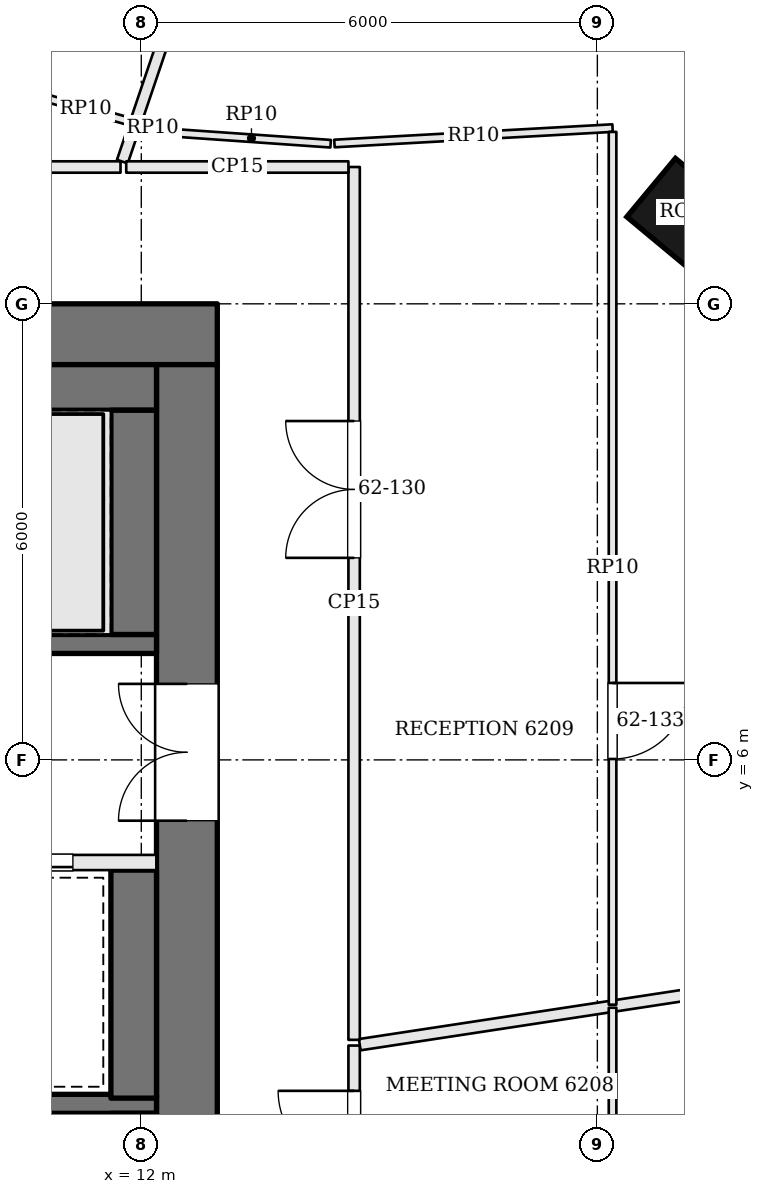
"""IFC4 building model, lengths in metres.
Left out: names, types, materials, properties, quantities, classifications, styles, units other than length and angle.
Written with IfcOpenShell. Run it as: python <this file> out.ifc"""

import sys

from ifc_helpers import new_model, si_unit, direction, frame, frame_2d, origin, origin_2d, place, context, subcontext, project, spatial, rectangle, extrude, element, fill, save


model = new_model("IFC4")
c1 = context("Model", 3, precision=1e-05, world=origin(), true_north=direction((0.0, 1.0)))
c2 = subcontext(c1, "Body", "Model", "MODEL_VIEW")
j1 = project(units=[si_unit("LENGTHUNIT", "METRE"), si_unit("PLANEANGLEUNIT", "RADIAN")], contexts=[c1])
p1 = place(None, origin())
s1 = spatial("IfcSite", under=j1, at=p1, CompositionType="ELEMENT")
p2 = place(p1, origin())
s2 = spatial("IfcBuilding", under=s1, at=p2, CompositionType="ELEMENT")
p3 = place(p2, frame((0.0, 0.0, 252.6)))
s3 = spatial("IfcBuildingStorey", under=s2, at=p3, CompositionType="ELEMENT", Elevation=252.6)
p4 = place(p3, frame((-13.0, 11.6, 0.0), z_axis=(0.0, 0.0, 1.0), x_axis=(1.0, 0.0, 0.0)))
e1 = element("IfcWall", 1, at=p4, inside=s3, PredefinedType="SHEAR", context=c2, shape_type="SweptSolid", body=[
    extrude(rectangle(XDim=26.0, YDim=0.8, at=frame_2d((13.0, 0.0))), origin(), (0.0, 0.0, 1.0), 3.9),
])
p5 = place(p4, frame((9.65, 0.0, 0.0)))
e2 = element("IfcOpeningElement", 2, at=p5, cuts=e1, PredefinedType="OPENING", context=c2, shape_type="SweptSolid", body=[
    extrude(rectangle(XDim=1.0, YDim=2.1, at=frame_2d((0.5, 1.05))), frame((0.0, 0.41, 0.0), z_axis=(0.0, -1.0, 0.0), x_axis=(1.0, 0.0, 0.0)), (0.0, 0.0, 1.0), 0.82),
])
p6 = place(p4, frame((12.675, 0.0, 0.0)))
e3 = element("IfcOpeningElement", 3, at=p6, cuts=e1, PredefinedType="OPENING", context=c2, shape_type="SweptSolid", body=[
    extrude(rectangle(XDim=0.7, YDim=2.1, at=frame_2d((0.35, 1.05))), frame((0.0, 0.41, 0.0), z_axis=(0.0, -1.0, 0.0), x_axis=(1.0, 0.0, 0.0)), (0.0, 0.0, 1.0), 0.82),
])
p7 = place(p4, frame((14.725, 0.0, 0.0)))
e4 = element("IfcOpeningElement", 4, at=p7, cuts=e1, PredefinedType="OPENING", context=c2, shape_type="SweptSolid", body=[
    extrude(rectangle(XDim=0.7, YDim=2.1, at=frame_2d((0.35, 1.05))), frame((0.0, 0.41, 0.0), z_axis=(0.0, -1.0, 0.0), x_axis=(1.0, 0.0, 0.0)), (0.0, 0.0, 1.0), 0.82),
])
p8 = place(p4, frame((16.6, 0.0, 0.0)))
e5 = element("IfcOpeningElement", 5, at=p8, cuts=e1, PredefinedType="OPENING", context=c2, shape_type="SweptSolid", body=[
    extrude(rectangle(XDim=1.0, YDim=2.1, at=frame_2d((0.5, 1.05))), frame((0.0, 0.41, 0.0), z_axis=(0.0, -1.0, 0.0), x_axis=(1.0, 0.0, 0.0)), (0.0, 0.0, 1.0), 0.82),
])
p9 = place(p3, frame((12.6, -2.2, 0.0), z_axis=(0.0, 0.0, 1.0), x_axis=(0.0, 1.0, 0.0)))
e6 = element("IfcWall", 6, at=p9, inside=s3, PredefinedType="SHEAR", context=c2, shape_type="SweptSolid", body=[
    extrude(rectangle(XDim=13.4, YDim=0.8, at=frame_2d((6.7, 0.0))), origin(), (0.0, 0.0, 1.0), 3.9),
])
p10 = place(p9, frame((7.4, 0.0, 0.0)))
e7 = element("IfcOpeningElement", 7, at=p10, cuts=e6, PredefinedType="OPENING", context=c2, shape_type="SweptSolid", body=[
    extrude(rectangle(XDim=1.8, YDim=2.1, at=frame_2d((0.9, 1.05))), frame((0.0, 0.41, 0.0), z_axis=(0.0, -1.0, 0.0), x_axis=(1.0, 0.0, 0.0)), (0.0, 0.0, 1.0), 0.82),
])
p11 = place(p3, frame((19.092, 13.209, 0.0), z_axis=(0.0, 0.0, 1.0), x_axis=(-0.76886986222, 0.63940529789, 0.0)))
e8 = element("IfcColumn", 8, at=p11, inside=s3, PredefinedType="COLUMN", context=c2, shape_type="SweptSolid", body=[
    extrude(rectangle(XDim=1.0, YDim=1.0, at=origin_2d()), origin(), (0.0, 0.0, 1.0), 3.9),
])
p12 = place(p3, frame((12.2, 7.525, 0.0), z_axis=(0.0, 0.0, 1.0), x_axis=(-1.0, 0.0, 0.0)))
e9 = element("IfcWall", 9, at=p12, inside=s3, PredefinedType="SOLIDWALL", context=c2, shape_type="SweptSolid", body=[
    extrude(rectangle(XDim=7.1, YDim=0.25, at=frame_2d((3.55, 0.0))), origin(), (0.0, 0.0, 1.0), 3.7),
])
p13 = place(p12, frame((5.8, 0.0, 0.0)))
e10 = element("IfcOpeningElement", 10, at=p13, cuts=e9, PredefinedType="OPENING", context=c2, shape_type="SweptSolid", body=[
    extrude(rectangle(XDim=1.2, YDim=2.1, at=frame_2d((0.6, 1.05))), frame((0.0, 0.135, 0.0), z_axis=(0.0, -1.0, 0.0), x_axis=(1.0, 0.0, 0.0)), (0.0, 0.0, 1.0), 0.27),
])
p14 = place(p3, frame((12.2, 4.65, 0.0), z_axis=(0.0, 0.0, 1.0), x_axis=(-1.0, 0.0, 0.0)))
e11 = element("IfcWall", 11, at=p14, inside=s3, PredefinedType="SOLIDWALL", context=c2, shape_type="SweptSolid", body=[
    extrude(rectangle(XDim=7.1, YDim=0.2, at=frame_2d((3.55, 0.0))), origin(), (0.0, 0.0, 1.0), 3.7),
])
p15 = place(p14, frame((4.4, 0.0, 0.0)))
e12 = element("IfcOpeningElement", 12, at=p15, cuts=e11, PredefinedType="OPENING", context=c2, shape_type="SweptSolid", body=[
    extrude(rectangle(XDim=1.2, YDim=2.1, at=frame_2d((0.6, 1.05))), frame((0.0, 0.11, 0.0), z_axis=(0.0, -1.0, 0.0), x_axis=(1.0, 0.0, 0.0)), (0.0, 0.0, 1.0), 0.22),
])
p16 = place(p14, frame((1.1, 0.0, 0.0)))
e13 = element("IfcOpeningElement", 13, at=p16, cuts=e11, PredefinedType="OPENING", context=c2, shape_type="SweptSolid", body=[
    extrude(rectangle(XDim=1.2, YDim=2.1, at=frame_2d((0.6, 1.05))), frame((0.0, 0.11, 0.0), z_axis=(0.0, -1.0, 0.0), x_axis=(1.0, 0.0, 0.0)), (0.0, 0.0, 1.0), 0.22),
])
p17 = place(p3, frame((12.2, 1.475, 0.0), z_axis=(0.0, 0.0, 1.0), x_axis=(-1.0, 0.0, 0.0)))
e14 = element("IfcWall", 14, at=p17, inside=s3, PredefinedType="SOLIDWALL", context=c2, shape_type="SweptSolid", body=[
    extrude(rectangle(XDim=7.1, YDim=0.25, at=frame_2d((3.55, 0.0))), origin(), (0.0, 0.0, 1.0), 3.7),
])
p18 = place(p17, frame((5.8, 0.0, 0.0)))
e15 = element("IfcOpeningElement", 15, at=p18, cuts=e14, PredefinedType="OPENING", context=c2, shape_type="SweptSolid", body=[
    extrude(rectangle(XDim=1.2, YDim=2.1, at=frame_2d((0.6, 1.05))), frame((0.0, 0.135, 0.0), z_axis=(0.0, -1.0, 0.0), x_axis=(1.0, 0.0, 0.0)), (0.0, 0.0, 1.0), 0.27),
])
p19 = place(p3, frame((12.2, 10.9, 0.0), z_axis=(0.0, 0.0, 1.0), x_axis=(-1.0, 0.0, 0.0)))
e16 = element("IfcWall", 16, at=p19, inside=s3, PredefinedType="SOLIDWALL", context=c2, shape_type="SweptSolid", body=[
    extrude(rectangle(XDim=7.1, YDim=0.6, at=frame_2d((3.55, 0.0))), origin(), (0.0, 0.0, 1.0), 3.7),
])
p20 = place(p3, frame((11.9, 10.6, 0.0), z_axis=(0.0, 0.0, 1.0), x_axis=(0.0, -1.0, 0.0)))
e17 = element("IfcWall", 17, at=p20, inside=s3, PredefinedType="SOLIDWALL", context=c2, shape_type="SweptSolid", body=[
    extrude(rectangle(XDim=2.95, YDim=0.6, at=frame_2d((1.475, 0.0))), origin(), (0.0, 0.0, 1.0), 3.7),
])
p21 = place(p3, frame((11.9, 4.55, 0.0), z_axis=(0.0, 0.0, 1.0), x_axis=(0.0, -1.0, 0.0)))
e18 = element("IfcWall", 18, at=p21, inside=s3, PredefinedType="SOLIDWALL", context=c2, shape_type="SweptSolid", body=[
    extrude(rectangle(XDim=3.0, YDim=0.6, at=frame_2d((1.5, 0.0))), origin(), (0.0, 0.0, 1.0), 3.7),
])
p22 = place(p3, frame((11.9, 1.35, 0.0), z_axis=(0.0, 0.0, 1.0), x_axis=(0.0, -1.0, 0.0)))
e19 = element("IfcWall", 19, at=p22, inside=s3, PredefinedType="SOLIDWALL", context=c2, shape_type="SweptSolid", body=[
    extrude(rectangle(XDim=2.95, YDim=0.6, at=frame_2d((1.475, 0.0))), origin(), (0.0, 0.0, 1.0), 3.7),
])
p23 = place(p3, frame((11.727, 13.8, 0.0), z_axis=(0.0, 0.0, 1.0), x_axis=(-1.0, 0.0, 0.0)))
e20 = element("IfcWall", 20, at=p23, inside=s3, PredefinedType="PARTITIONING", context=c2, shape_type="SweptSolid", body=[
    extrude(rectangle(XDim=11.554, YDim=0.15, at=frame_2d((5.777, 0.0))), origin(), (0.0, 0.0, 1.0), 3.084),
])
p24 = place(p23, frame((2.04, 0.0, 0.0)))
e21 = element("IfcOpeningElement", 21, at=p24, cuts=e20, PredefinedType="OPENING", context=c2, shape_type="SweptSolid", body=[
    extrude(rectangle(XDim=1.8, YDim=2.1, at=frame_2d((0.9, 1.05))), frame((0.0, 0.085, 0.0), z_axis=(0.0, -1.0, 0.0), x_axis=(1.0, 0.0, 0.0)), (0.0, 0.0, 1.0), 0.17),
])
p25 = place(p23, frame((6.737, 0.0, 0.0)))
e22 = element("IfcOpeningElement", 22, at=p25, cuts=e20, PredefinedType="OPENING", context=c2, shape_type="SweptSolid", body=[
    extrude(rectangle(XDim=1.0, YDim=2.4, at=frame_2d((0.5, 1.2))), frame((0.0, 0.085, 0.0), z_axis=(0.0, -1.0, 0.0), x_axis=(1.0, 0.0, 0.0)), (0.0, 0.0, 1.0), 0.17),
])
p26 = place(p3, frame((12.878, 17.2, 0.0), z_axis=(0.0, 0.0, 1.0), x_axis=(-0.320642197559, -0.947200391229, 0.0)))
e23 = element("IfcWall", 23, at=p26, inside=s3, PredefinedType="PARTITIONING", context=c2, shape_type="SweptSolid", body=[
    extrude(rectangle(XDim=3.515, YDim=0.15, at=frame_2d((1.757, 0.0))), origin(), (0.0, 0.0, 1.0), 3.084),
])
p27 = place(p3, frame((14.8, -4.725, 0.0), z_axis=(0.0, 0.0, 1.0), x_axis=(0.0, 1.0, 0.0)))
e24 = element("IfcWall", 24, at=p27, inside=s3, PredefinedType="PARTITIONING", context=c2, shape_type="SweptSolid", body=[
    extrude(rectangle(XDim=6.967, YDim=0.15, at=frame_2d((3.483, 0.0))), origin(), (0.0, 0.0, 1.0), 3.084),
])
p28 = place(p27, frame((2.407, 0.0, 0.0)))
e25 = element("IfcOpeningElement", 25, at=p28, cuts=e24, PredefinedType="OPENING", context=c2, shape_type="SweptSolid", body=[
    extrude(rectangle(XDim=1.0, YDim=2.4, at=frame_2d((0.5, 1.2))), frame((0.0, 0.085, 0.0), z_axis=(0.0, -1.0, 0.0), x_axis=(1.0, 0.0, 0.0)), (0.0, 0.0, 1.0), 0.17),
])
p29 = place(p27, frame((5.371, 0.0, 0.0)))
e26 = element("IfcOpeningElement", 26, at=p29, cuts=e24, PredefinedType="OPENING", context=c2, shape_type="SweptSolid", body=[
    extrude(rectangle(XDim=1.0, YDim=2.4, at=frame_2d((0.5, 1.2))), frame((0.0, 0.085, 0.0), z_axis=(0.0, -1.0, 0.0), x_axis=(1.0, 0.0, 0.0)), (0.0, 0.0, 1.0), 0.17),
])
p30 = place(p3, frame((24.076, 3.654, 0.0), z_axis=(0.0, 0.0, 1.0), x_axis=(-0.988612730302, -0.150482123474, 0.0)))
e27 = element("IfcWall", 27, at=p30, inside=s3, PredefinedType="PARTITIONING", context=c2, shape_type="SweptSolid", body=[
    extrude(rectangle(XDim=9.308, YDim=0.15, at=frame_2d((4.654, 0.0))), origin(), (0.0, 0.0, 1.0), 3.084),
])
p31 = place(p3, frame((14.8, 2.317, 0.0), z_axis=(0.0, 0.0, 1.0), x_axis=(0.0, 1.0, 0.0)))
e28 = element("IfcWall", 28, at=p31, inside=s3, PredefinedType="PARTITIONING", context=c2, shape_type="SweptSolid", body=[
    extrude(rectangle(XDim=11.483, YDim=0.15, at=frame_2d((5.742, 0.0))), origin(), (0.0, 0.0, 1.0), 3.084),
])
p32 = place(p31, frame((6.341, 0.0, 0.0)))
e29 = element("IfcOpeningElement", 29, at=p32, cuts=e28, PredefinedType="OPENING", context=c2, shape_type="SweptSolid", body=[
    extrude(rectangle(XDim=1.8, YDim=2.1, at=frame_2d((0.9, 1.05))), frame((0.0, 0.085, 0.0), z_axis=(0.0, -1.0, 0.0), x_axis=(1.0, 0.0, 0.0)), (0.0, 0.0, 1.0), 0.17),
])
p33 = place(p3, frame((14.725, 13.8, 0.0), z_axis=(0.0, 0.0, 1.0), x_axis=(-1.0, 0.0, 0.0)))
e30 = element("IfcWall", 30, at=p33, inside=s3, PredefinedType="PARTITIONING", context=c2, shape_type="SweptSolid", body=[
    extrude(rectangle(XDim=2.923, YDim=0.15, at=frame_2d((1.462, 0.0))), origin(), (0.0, 0.0, 1.0), 3.084),
])
p34 = place(p3, frame((10.635, 14.738, 0.0), z_axis=(0.0, 0.0, 1.0), x_axis=(0.962794316294, -0.270235276217, 0.0)))
e31 = element("IfcWall", 31, at=p34, inside=s3, PredefinedType="PARTITIONING", context=c2, shape_type="SweptSolid", body=[
    extrude(rectangle(XDim=1.316, YDim=0.1, at=frame_2d((0.658, 0.0))), origin(), (0.0, 0.0, 1.0), 3.084),
])
p35 = place(p3, frame((18.2, 2.74, 0.0), z_axis=(0.0, 0.0, 1.0), x_axis=(0.0, -1.0, 0.0)))
e32 = element("IfcWall", 32, at=p35, inside=s3, PredefinedType="PARTITIONING", context=c2, shape_type="SweptSolid", body=[
    extrude(rectangle(XDim=10.939, YDim=0.1, at=frame_2d((5.47, 0.0))), origin(), (0.0, 0.0, 1.0), 3.084),
])
p36 = place(p3, frame((11.941, 14.372, 0.0), z_axis=(0.0, 0.0, 1.0), x_axis=(0.962770354452, -0.270320632932, 0.0)))
e33 = element("IfcWall", 33, at=p36, inside=s3, PredefinedType="PARTITIONING", context=c2, shape_type="SweptSolid", body=[
    extrude(rectangle(XDim=0.433, YDim=0.1, at=frame_2d((0.216, 0.0))), origin(), (0.0, 0.0, 1.0), 3.084),
])
p37 = place(p3, frame((12.408, 14.251, 0.0), z_axis=(0.0, 0.0, 1.0), x_axis=(0.997594502721, -0.069319608638, 0.0)))
e34 = element("IfcWall", 34, at=p37, inside=s3, PredefinedType="PARTITIONING", context=c2, shape_type="SweptSolid", body=[
    extrude(rectangle(XDim=2.089, YDim=0.1, at=frame_2d((1.044, 0.0))), origin(), (0.0, 0.0, 1.0), 3.084),
])
p38 = place(p3, frame((14.541, 14.109, 0.0), z_axis=(0.0, 0.0, 1.0), x_axis=(0.998466292218, 0.055363013868, 0.0)))
e35 = element("IfcWall", 35, at=p38, inside=s3, PredefinedType="PARTITIONING", context=c2, shape_type="SweptSolid", body=[
    extrude(rectangle(XDim=3.665, YDim=0.1, at=frame_2d((1.832, 0.0))), origin(), (0.0, 0.0, 1.0), 3.084),
])
p39 = place(p3, frame((18.2, 14.262, 0.0), z_axis=(0.0, 0.0, 1.0), x_axis=(0.0, -1.0, 0.0)))
e36 = element("IfcWall", 36, at=p39, inside=s3, PredefinedType="PARTITIONING", context=c2, shape_type="SweptSolid", body=[
    extrude(rectangle(XDim=11.482, YDim=0.1, at=frame_2d((5.741, 0.0))), origin(), (0.0, 0.0, 1.0), 3.084),
])
p40 = place(p39, frame((7.25, 0.0, 0.0)))
e37 = element("IfcOpeningElement", 37, at=p40, cuts=e36, PredefinedType="OPENING", context=c2, shape_type="SweptSolid", body=[
    extrude(rectangle(XDim=1.0, YDim=2.1, at=frame_2d((0.5, 1.05))), frame((0.0, 0.06, 0.0), z_axis=(0.0, -1.0, 0.0), x_axis=(1.0, 0.0, 0.0)), (0.0, 0.0, 1.0), 0.12),
])
p41 = place(p10, origin())
e38 = element("IfcDoor", 38, at=p41, inside=s3, OperationType="DOUBLE_DOOR_SINGLE_SWING", PredefinedType="DOOR", context=c2, shape_type="SweptSolid", body=[
    extrude(rectangle(XDim=1.8, YDim=2.1, at=frame_2d((0.9, 1.05))), frame((0.0, 0.025, 0.0), z_axis=(0.0, -1.0, 0.0), x_axis=(1.0, 0.0, 0.0)), (0.0, 0.0, 1.0), 0.05),
])
fill(e7, e38)
p42 = place(p16, origin())
e39 = element("IfcDoor", 39, at=p42, inside=s3, OperationType="SLIDING_TO_RIGHT", PredefinedType="DOOR", context=c2, shape_type="SweptSolid", body=[
    extrude(rectangle(XDim=1.2, YDim=2.1, at=frame_2d((0.6, 1.05))), frame((0.0, 0.025, 0.0), z_axis=(0.0, -1.0, 0.0), x_axis=(1.0, 0.0, 0.0)), (0.0, 0.0, 1.0), 0.05),
])
fill(e13, e39)
p43 = place(p29, origin())
e40 = element("IfcDoor", 40, at=p43, inside=s3, OperationType="SINGLE_SWING_RIGHT", PredefinedType="DOOR", context=c2, shape_type="SweptSolid", body=[
    extrude(rectangle(XDim=1.0, YDim=2.4, at=frame_2d((0.5, 1.2))), frame((0.0, 0.025, 0.0), z_axis=(0.0, -1.0, 0.0), x_axis=(1.0, 0.0, 0.0)), (0.0, 0.0, 1.0), 0.05),
])
fill(e26, e40)
p44 = place(p32, origin())
e41 = element("IfcDoor", 41, at=p44, inside=s3, OperationType="DOUBLE_DOOR_SINGLE_SWING", PredefinedType="DOOR", context=c2, shape_type="SweptSolid", body=[
    extrude(rectangle(XDim=1.8, YDim=2.1, at=frame_2d((0.9, 1.05))), frame((0.0, 0.025, 0.0), z_axis=(0.0, -1.0, 0.0), x_axis=(1.0, 0.0, 0.0)), (0.0, 0.0, 1.0), 0.05),
])
fill(e29, e41)
p45 = place(p40, origin())
e42 = element("IfcDoor", 42, at=p45, inside=s3, OperationType="SINGLE_SWING_LEFT", PredefinedType="DOOR", context=c2, shape_type="SweptSolid", body=[
    extrude(rectangle(XDim=1.0, YDim=2.1, at=frame_2d((0.5, 1.05))), frame((0.0, 0.025, 0.0), z_axis=(0.0, -1.0, 0.0), x_axis=(1.0, 0.0, 0.0)), (0.0, 0.0, 1.0), 0.05),
])
fill(e37, e42)
save(model, sys.argv[1])
